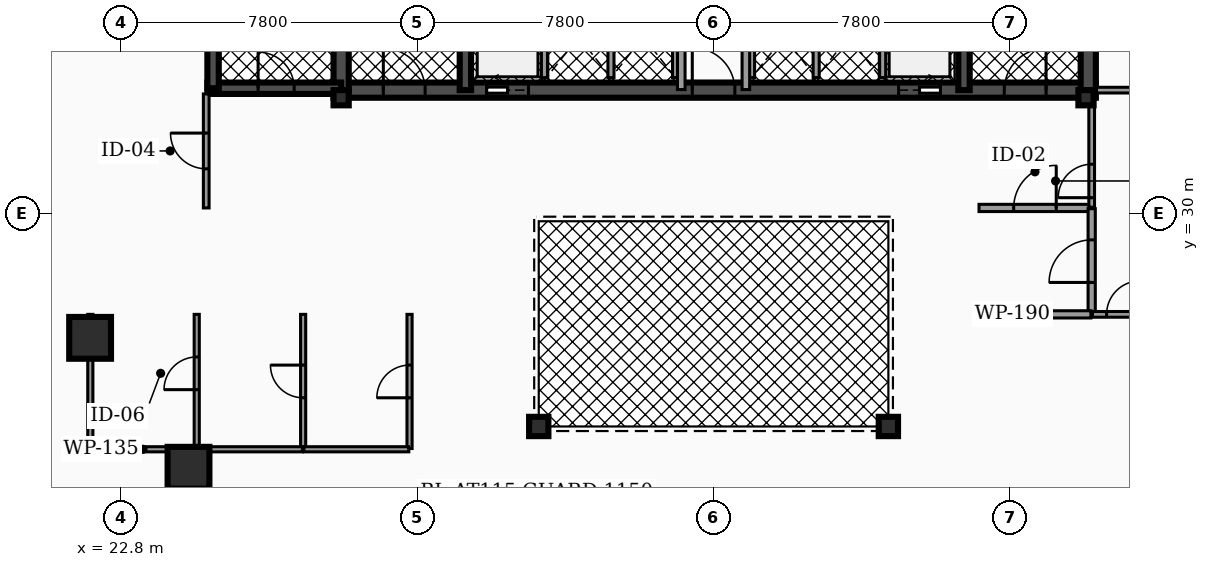
"""IFC4 building model, lengths in metres.
Left out: names, types, materials, properties, quantities, classifications, styles, units other than length and angle.
Written with IfcOpenShell. Run it as: python <this file> out.ifc"""

import sys

from ifc_helpers import new_model, si_unit, direction, frame, frame_2d, origin, origin_2d, place, context, subcontext, project, spatial, rectangle, hollow_rectangle, hollow_circle, extrude, element, fill, save


model = new_model("IFC4")
c1 = context("Model", 3, precision=1e-05, world=origin(), true_north=direction((0.0, 1.0)))
c2 = subcontext(c1, "Body", "Model", "MODEL_VIEW")
j1 = project(units=[si_unit("LENGTHUNIT", "METRE"), si_unit("PLANEANGLEUNIT", "RADIAN")], contexts=[c1])
p1 = place(None, origin())
s1 = spatial("IfcSite", under=j1, at=p1, CompositionType="ELEMENT")
p2 = place(p1, origin())
s2 = spatial("IfcBuilding", under=s1, at=p2, CompositionType="ELEMENT")
p3 = place(p2, frame((0.0, 0.0, 5.1)))
s3 = spatial("IfcBuildingStorey", under=s2, at=p3, CompositionType="ELEMENT", Elevation=5.1)
p4 = place(p3, frame((28.4, 33.25, 0.0), z_axis=(0.0, 0.0, 1.0), x_axis=(1.0, 0.0, 0.0)))
e1 = element("IfcWall", 1, at=p4, inside=s3, PredefinedType="SHEAR", context=c2, shape_type="SweptSolid", body=[
    extrude(rectangle(XDim=20.06, YDim=0.4, at=frame_2d((10.03, 0.0))), origin(), (0.0, 0.0, 1.0), 4.14),
])
p5 = place(p4, frame((4.03, 0.0, 0.0)))
e2 = element("IfcOpeningElement", 2, at=p5, cuts=e1, PredefinedType="OPENING", context=c2, shape_type="SweptSolid", body=[
    extrude(rectangle(XDim=1.1, YDim=2.15, at=frame_2d((0.55, 1.075))), frame((0.0, 0.21, 0.0), z_axis=(0.0, -1.0, 0.0), x_axis=(1.0, 0.0, 0.0)), (0.0, 0.0, 1.0), 0.42),
])
p6 = place(p4, frame((14.87, 0.0, 0.0)))
e3 = element("IfcOpeningElement", 3, at=p6, cuts=e1, PredefinedType="OPENING", context=c2, shape_type="SweptSolid", body=[
    extrude(rectangle(XDim=1.1, YDim=2.15, at=frame_2d((0.55, 1.075))), frame((0.0, 0.21, 0.0), z_axis=(0.0, -1.0, 0.0), x_axis=(1.0, 0.0, 0.0)), (0.0, 0.0, 1.0), 0.42),
])
p7 = place(p4, frame((1.31, 0.0, 0.0)))
e4 = element("IfcOpeningElement", 4, at=p7, cuts=e1, PredefinedType="OPENING", context=c2, shape_type="SweptSolid", body=[
    extrude(rectangle(XDim=1.1, YDim=2.2, at=frame_2d((0.55, 1.1))), frame((0.0, 0.21, 0.0), z_axis=(0.0, -1.0, 0.0), x_axis=(1.0, 0.0, 0.0)), (0.0, 0.0, 1.0), 0.42),
])
p8 = place(p4, frame((9.44, 0.0, 0.0)))
e5 = element("IfcOpeningElement", 5, at=p8, cuts=e1, PredefinedType="OPENING", context=c2, shape_type="SweptSolid", body=[
    extrude(rectangle(XDim=1.12, YDim=2.05, at=frame_2d((0.56, 1.025))), frame((0.0, 0.21, 0.0), z_axis=(0.0, -1.0, 0.0), x_axis=(1.0, 0.0, 0.0)), (0.0, 0.0, 1.0), 0.42),
])
p9 = place(p4, frame((17.65, 0.0, 0.0)))
e6 = element("IfcOpeningElement", 6, at=p9, cuts=e1, PredefinedType="OPENING", context=c2, shape_type="SweptSolid", body=[
    extrude(rectangle(XDim=1.1, YDim=2.2, at=frame_2d((0.55, 1.1))), frame((0.0, 0.21, 0.0), z_axis=(0.0, -1.0, 0.0), x_axis=(1.0, 0.0, 0.0)), (0.0, 0.0, 1.0), 0.42),
])
p10 = place(p3, frame((28.6, 33.25, 0.0), z_axis=(0.0, 0.0, 1.0), x_axis=(0.0, 1.0, 0.0)))
e7 = element("IfcWall", 7, at=p10, inside=s3, PredefinedType="SHEAR", context=c2, shape_type="SweptSolid", body=[
    extrude(rectangle(XDim=10.2, YDim=0.4, at=frame_2d((5.1, 0.0))), origin(), (0.0, 0.0, 1.0), 4.14),
])
for number, where, z_axis, x_axis in (
    (8, (31.87, 33.25, 0.0), (0.0, 0.0, 1.0), (0.0, 1.0, 0.0)),
    (9, (44.99, 33.25, 0.0), (0.0, 0.0, 1.0), (0.0, 1.0, 0.0)),
):
    element("IfcWall", number, at=place(p3, frame(where, z_axis=z_axis, x_axis=x_axis)), inside=s3, PredefinedType="SHEAR", context=c2, shape_type="SweptSolid", body=[
        extrude(rectangle(XDim=10.2, YDim=0.3, at=frame_2d((5.1, 0.0))), origin(), (0.0, 0.0, 1.0), 4.14),
    ])
p11 = place(p3, frame((48.26, 33.25, 0.0), z_axis=(0.0, 0.0, 1.0), x_axis=(0.0, 1.0, 0.0)))
e10 = element("IfcWall", 10, at=p11, inside=s3, PredefinedType="SHEAR", context=c2, shape_type="SweptSolid", body=[
    extrude(rectangle(XDim=10.2, YDim=0.4, at=frame_2d((5.1, 0.0))), origin(), (0.0, 0.0, 1.0), 4.14),
])
p12 = place(p3, frame((25.08, 33.3, 0.0), z_axis=(0.0, 0.0, 1.0), x_axis=(1.0, 0.0, 0.0)))
e11 = element("IfcWall", 11, at=p12, inside=s3, PredefinedType="SHEAR", context=c2, shape_type="SweptSolid", body=[
    extrude(rectangle(XDim=3.52, YDim=0.3, at=frame_2d((1.76, 0.0))), origin(), (0.0, 0.0, 1.0), 4.14),
])
p13 = place(p12, frame((1.335, 0.0, 0.0)))
e12 = element("IfcOpeningElement", 12, at=p13, cuts=e11, PredefinedType="OPENING", context=c2, shape_type="SweptSolid", body=[
    extrude(rectangle(XDim=0.95, YDim=2.2, at=frame_2d((0.475, 1.1))), frame((0.0, 0.16, 0.0), z_axis=(0.0, -1.0, 0.0), x_axis=(1.0, 0.0, 0.0)), (0.0, 0.0, 1.0), 0.32),
])
p14 = place(p3, frame((25.23, 33.3, 0.0), z_axis=(0.0, 0.0, 1.0), x_axis=(0.0, 1.0, 0.0)))
e13 = element("IfcWall", 13, at=p14, inside=s3, PredefinedType="SHEAR", context=c2, shape_type="SweptSolid", body=[
    extrude(rectangle(XDim=7.6, YDim=0.3, at=frame_2d((3.8, 0.0))), origin(), (0.0, 0.0, 1.0), 4.14),
])
for number, where, z_axis, x_axis in (
    (14, (21.994, 26.732, 0.0), (0.0, 0.0, 1.0), (1.0, 0.0, 0.0)),
    (15, (24.583, 23.314, 0.0), (0.0, 0.0, 1.0), (1.0, 0.0, 0.0)),
):
    element("IfcColumn", number, at=place(p3, frame(where, z_axis=z_axis, x_axis=x_axis)), inside=s3, PredefinedType="COLUMN", context=c2, shape_type="SweptSolid", body=[
        extrude(hollow_rectangle(XDim=1.1, YDim=1.1, WallThickness=0.055, at=origin_2d()), origin(), (0.0, 0.0, 1.0), 4.14),
    ])
for number, where, z_axis, x_axis in (
    (16, (28.6, 33.05, 0.0), (0.0, 0.0, 1.0), (1.0, 0.0, 0.0)),
    (17, (48.2, 33.05, 0.0), (0.0, 0.0, 1.0), (1.0, 0.0, 0.0)),
):
    element("IfcColumn", number, at=place(p3, frame(where, z_axis=z_axis, x_axis=x_axis)), inside=s3, PredefinedType="PILASTER", context=c2, shape_type="SweptSolid", body=[
        extrude(hollow_rectangle(XDim=0.4, YDim=0.4, WallThickness=0.02, at=origin_2d()), origin(), (0.0, 0.0, 1.0), 4.14),
    ])
for number, where, z_axis, x_axis in (
    (18, (33.8, 24.4, 0.0), (0.0, 0.0, 1.0), (1.0, 0.0, 0.0)),
    (19, (43.0, 24.4, 0.0), (0.0, 0.0, 1.0), (1.0, 0.0, 0.0)),
):
    element("IfcColumn", number, at=place(p3, frame(where, z_axis=z_axis, x_axis=x_axis)), inside=s3, PredefinedType="COLUMN", context=c2, shape_type="SweptSolid", body=[
        extrude(hollow_circle(Radius=0.254, WallThickness=0.02, at=origin_2d()), origin(), (0.0, 0.0, 1.0), 4.14),
    ])
for number, where, z_axis, x_axis in (
    (20, (33.95, 33.58, 0.0), (0.0, 0.0, 1.0), (0.0, 1.0, 0.0)),
    (21, (42.85, 33.58, 0.0), (0.0, 0.0, 1.0), (0.0, 1.0, 0.0)),
):
    element("IfcWall", number, at=place(p3, frame(where, z_axis=z_axis, x_axis=x_axis)), inside=s3, PredefinedType="SOLIDWALL", context=c2, shape_type="SweptSolid", body=[
        extrude(rectangle(XDim=2.45, YDim=0.16, at=frame_2d((1.225, 0.0))), origin(), (0.0, 0.0, 1.0), 3.112),
    ])
for number, where, z_axis, x_axis in (
    (22, (35.7, 33.58, 0.0), (0.0, 0.0, 1.0), (0.0, 1.0, 0.0)),
    (23, (37.4, 33.58, 0.0), (0.0, 0.0, 1.0), (0.0, 1.0, 0.0)),
    (24, (39.4, 33.58, 0.0), (0.0, 0.0, 1.0), (0.0, 1.0, 0.0)),
    (25, (41.1, 33.58, 0.0), (0.0, 0.0, 1.0), (0.0, 1.0, 0.0)),
):
    element("IfcWall", number, at=place(p3, frame(where, z_axis=z_axis, x_axis=x_axis)), inside=s3, PredefinedType="SOLIDWALL", context=c2, shape_type="SweptSolid", body=[
        extrude(rectangle(XDim=2.25, YDim=0.16, at=frame_2d((1.125, 0.0))), origin(), (0.0, 0.0, 1.0), 3.112),
    ])
p15 = place(p3, frame((37.55, 33.265, 0.0), z_axis=(0.0, 0.0, 1.0), x_axis=(0.0, 1.0, 0.0)))
e26 = element("IfcWall", 26, at=p15, inside=s3, PredefinedType="PARTITIONING", context=c2, shape_type="SweptSolid", body=[
    extrude(rectangle(XDim=4.265, YDim=0.2, at=frame_2d((2.133, 0.0))), origin(), (0.0, 0.0, 1.0), 3.097),
])
p16 = place(p15, frame((3.093, 0.0, 0.0)))
e27 = element("IfcOpeningElement", 27, at=p16, cuts=e26, PredefinedType="OPENING", context=c2, shape_type="SweptSolid", body=[
    extrude(rectangle(XDim=0.88, YDim=2.05, at=frame_2d((0.44, 1.025))), frame((0.0, 0.11, 0.0), z_axis=(0.0, -1.0, 0.0), x_axis=(1.0, 0.0, 0.0)), (0.0, 0.0, 1.0), 0.22),
])
p17 = place(p3, frame((39.25, 33.265, 0.0), z_axis=(0.0, 0.0, 1.0), x_axis=(0.0, 1.0, 0.0)))
e28 = element("IfcWall", 28, at=p17, inside=s3, PredefinedType="PARTITIONING", context=c2, shape_type="SweptSolid", body=[
    extrude(rectangle(XDim=4.265, YDim=0.2, at=frame_2d((2.133, 0.0))), origin(), (0.0, 0.0, 1.0), 3.097),
])
p18 = place(p17, frame((3.093, 0.0, 0.0)))
e29 = element("IfcOpeningElement", 29, at=p18, cuts=e28, PredefinedType="OPENING", context=c2, shape_type="SweptSolid", body=[
    extrude(rectangle(XDim=0.88, YDim=2.05, at=frame_2d((0.44, 1.025))), frame((0.0, 0.11, 0.0), z_axis=(0.0, -1.0, 0.0), x_axis=(1.0, 0.0, 0.0)), (0.0, 0.0, 1.0), 0.22),
])
p19 = place(p3, frame((45.385, 30.15, 0.0), z_axis=(0.0, 0.0, 1.0), x_axis=(1.0, 0.0, 0.0)))
e30 = element("IfcWall", 30, at=p19, inside=s3, PredefinedType="PARTITIONING", context=c2, shape_type="SweptSolid", body=[
    extrude(rectangle(XDim=2.945, YDim=0.19, at=frame_2d((1.473, 0.0))), origin(), (0.0, 0.0, 1.0), 3.097),
])
p20 = place(p19, frame((0.913, 0.0, 0.0)))
e31 = element("IfcOpeningElement", 31, at=p20, cuts=e30, PredefinedType="OPENING", context=c2, shape_type="SweptSolid", body=[
    extrude(rectangle(XDim=1.12, YDim=2.05, at=frame_2d((0.56, 1.025))), frame((0.0, 0.105, 0.0), z_axis=(0.0, -1.0, 0.0), x_axis=(1.0, 0.0, 0.0)), (0.0, 0.0, 1.0), 0.21),
])
p21 = place(p3, frame((48.35, 30.17, 0.0), z_axis=(0.0, 0.0, 1.0), x_axis=(0.0, 1.0, 0.0)))
e32 = element("IfcWall", 32, at=p21, inside=s3, PredefinedType="PARTITIONING", context=c2, shape_type="SweptSolid", body=[
    extrude(rectangle(XDim=2.975, YDim=0.15, at=frame_2d((1.488, 0.0))), origin(), (0.0, 0.0, 1.0), 3.097),
])
p22 = place(p21, frame((0.25, 0.0, 0.0)))
e33 = element("IfcOpeningElement", 33, at=p22, cuts=e32, PredefinedType="OPENING", context=c2, shape_type="SweptSolid", body=[
    extrude(rectangle(XDim=0.88, YDim=2.05, at=frame_2d((0.44, 1.025))), frame((0.0, 0.085, 0.0), z_axis=(0.0, -1.0, 0.0), x_axis=(1.0, 0.0, 0.0)), (0.0, 0.0, 1.0), 0.17),
])
p23 = place(p3, frame((25.05, 30.15, 0.0), z_axis=(0.0, 0.0, 1.0), x_axis=(0.0, 1.0, 0.0)))
e34 = element("IfcWall", 34, at=p23, inside=s3, PredefinedType="PARTITIONING", context=c2, shape_type="SweptSolid", body=[
    extrude(rectangle(XDim=3.0, YDim=0.15, at=frame_2d((1.5, 0.0))), origin(), (0.0, 0.0, 1.0), 3.097),
])
p24 = place(p23, frame((1.03, 0.0, 0.0)))
e35 = element("IfcOpeningElement", 35, at=p24, cuts=e34, PredefinedType="OPENING", context=c2, shape_type="SweptSolid", body=[
    extrude(rectangle(XDim=0.94, YDim=2.05, at=frame_2d((0.47, 1.025))), frame((0.0, 0.085, 0.0), z_axis=(0.0, -1.0, 0.0), x_axis=(1.0, 0.0, 0.0)), (0.0, 0.0, 1.0), 0.17),
])
p25 = place(p3, frame((48.35, 27.37, 0.0), z_axis=(0.0, 0.0, 1.0), x_axis=(0.0, 1.0, 0.0)))
e36 = element("IfcWall", 36, at=p25, inside=s3, PredefinedType="PARTITIONING", context=c2, shape_type="SweptSolid", body=[
    extrude(rectangle(XDim=2.76, YDim=0.19, at=frame_2d((1.38, 0.0))), origin(), (0.0, 0.0, 1.0), 3.097),
])
p26 = place(p25, frame((0.82, 0.0, 0.0)))
e37 = element("IfcOpeningElement", 37, at=p26, cuts=e36, PredefinedType="OPENING", context=c2, shape_type="SweptSolid", body=[
    extrude(rectangle(XDim=1.12, YDim=2.05, at=frame_2d((0.56, 1.025))), frame((0.0, 0.105, 0.0), z_axis=(0.0, -1.0, 0.0), x_axis=(1.0, 0.0, 0.0)), (0.0, 0.0, 1.0), 0.21),
])
p27 = place(p3, frame((45.4, 27.35, 0.0), z_axis=(0.0, 0.0, 1.0), x_axis=(1.0, 0.0, 0.0)))
e38 = element("IfcWall", 38, at=p27, inside=s3, PredefinedType="PARTITIONING", context=c2, shape_type="SweptSolid", body=[
    extrude(rectangle(XDim=2.93, YDim=0.19, at=frame_2d((1.465, 0.0))), origin(), (0.0, 0.0, 1.0), 3.097),
])
p28 = place(p3, frame((48.37, 27.35, 0.0), z_axis=(0.0, 0.0, 1.0), x_axis=(1.0, 0.0, 0.0)))
e39 = element("IfcWall", 39, at=p28, inside=s3, PredefinedType="PARTITIONING", context=c2, shape_type="SweptSolid", body=[
    extrude(rectangle(XDim=1.625, YDim=0.15, at=frame_2d((0.812, 0.0))), origin(), (0.0, 0.0, 1.0), 3.097),
])
p29 = place(p28, frame((0.373, 0.0, 0.0)))
e40 = element("IfcOpeningElement", 40, at=p29, cuts=e39, PredefinedType="OPENING", context=c2, shape_type="SweptSolid", body=[
    extrude(rectangle(XDim=0.88, YDim=2.05, at=frame_2d((0.44, 1.025))), frame((0.0, 0.085, 0.0), z_axis=(0.0, -1.0, 0.0), x_axis=(1.0, 0.0, 0.0)), (0.0, 0.0, 1.0), 0.17),
])
p30 = place(p3, frame((48.478, 33.25, 0.0), z_axis=(0.0, 0.0, 1.0), x_axis=(1.0, 0.0, 0.0)))
e41 = element("IfcWall", 41, at=p30, inside=s3, PredefinedType="PARTITIONING", context=c2, shape_type="SweptSolid", body=[
    extrude(rectangle(XDim=2.802, YDim=0.15, at=frame_2d((1.401, 0.0))), origin(), (0.0, 0.0, 1.0), 3.097),
])
p31 = place(p3, frame((24.8, 23.848, 0.0), z_axis=(0.0, 0.0, 1.0), x_axis=(0.0, 1.0, 0.0)))
e42 = element("IfcWall", 42, at=p31, inside=s3, PredefinedType="PARTITIONING", context=c2, shape_type="SweptSolid", body=[
    extrude(rectangle(XDim=3.502, YDim=0.135, at=frame_2d((1.751, 0.0))), origin(), (0.0, 0.0, 1.0), 3.097),
])
p32 = place(p31, frame((1.521, 0.0, 0.0)))
e43 = element("IfcOpeningElement", 43, at=p32, cuts=e42, PredefinedType="OPENING", context=c2, shape_type="SweptSolid", body=[
    extrude(rectangle(XDim=0.86, YDim=2.05, at=frame_2d((0.43, 1.025))), frame((0.0, 0.077, 0.0), z_axis=(0.0, -1.0, 0.0), x_axis=(1.0, 0.0, 0.0)), (0.0, 0.0, 1.0), 0.155),
])
p33 = place(p3, frame((22.02, 23.8, 0.0), z_axis=(0.0, 0.0, 1.0), x_axis=(1.0, 0.0, 0.0)))
e44 = element("IfcWall", 44, at=p33, inside=s3, PredefinedType="PARTITIONING", context=c2, shape_type="SweptSolid", body=[
    extrude(rectangle(XDim=2.732, YDim=0.135, at=frame_2d((1.366, 0.0))), origin(), (0.0, 0.0, 1.0), 3.097),
])
p34 = place(p3, frame((22.0, 23.82, 0.0), z_axis=(0.0, 0.0, 1.0), x_axis=(0.0, 1.0, 0.0)))
e45 = element("IfcWall", 45, at=p34, inside=s3, PredefinedType="PARTITIONING", context=c2, shape_type="SweptSolid", body=[
    extrude(rectangle(XDim=3.53, YDim=0.135, at=frame_2d((1.765, 0.0))), origin(), (0.0, 0.0, 1.0), 3.097),
])
p35 = place(p3, frame((27.6, 23.82, 0.0), z_axis=(0.0, 0.0, 1.0), x_axis=(0.0, 1.0, 0.0)))
e46 = element("IfcWall", 46, at=p35, inside=s3, PredefinedType="PARTITIONING", context=c2, shape_type="SweptSolid", body=[
    extrude(rectangle(XDim=3.53, YDim=0.135, at=frame_2d((1.765, 0.0))), origin(), (0.0, 0.0, 1.0), 3.097),
])
p36 = place(p35, frame((1.335, 0.0, 0.0)))
e47 = element("IfcOpeningElement", 47, at=p36, cuts=e46, PredefinedType="OPENING", context=c2, shape_type="SweptSolid", body=[
    extrude(rectangle(XDim=0.86, YDim=2.05, at=frame_2d((0.43, 1.025))), frame((0.0, 0.077, 0.0), z_axis=(0.0, -1.0, 0.0), x_axis=(1.0, 0.0, 0.0)), (0.0, 0.0, 1.0), 0.155),
])
p37 = place(p3, frame((24.848, 23.8, 0.0), z_axis=(0.0, 0.0, 1.0), x_axis=(1.0, 0.0, 0.0)))
e48 = element("IfcWall", 48, at=p37, inside=s3, PredefinedType="PARTITIONING", context=c2, shape_type="SweptSolid", body=[
    extrude(rectangle(XDim=2.732, YDim=0.135, at=frame_2d((1.366, 0.0))), origin(), (0.0, 0.0, 1.0), 3.097),
])
p38 = place(p3, frame((30.4, 23.82, 0.0), z_axis=(0.0, 0.0, 1.0), x_axis=(0.0, 1.0, 0.0)))
e49 = element("IfcWall", 49, at=p38, inside=s3, PredefinedType="PARTITIONING", context=c2, shape_type="SweptSolid", body=[
    extrude(rectangle(XDim=3.53, YDim=0.135, at=frame_2d((1.765, 0.0))), origin(), (0.0, 0.0, 1.0), 3.097),
])
p39 = place(p38, frame((1.335, 0.0, 0.0)))
e50 = element("IfcOpeningElement", 50, at=p39, cuts=e49, PredefinedType="OPENING", context=c2, shape_type="SweptSolid", body=[
    extrude(rectangle(XDim=0.86, YDim=2.05, at=frame_2d((0.43, 1.025))), frame((0.0, 0.077, 0.0), z_axis=(0.0, -1.0, 0.0), x_axis=(1.0, 0.0, 0.0)), (0.0, 0.0, 1.0), 0.155),
])
p40 = place(p3, frame((27.62, 23.8, 0.0), z_axis=(0.0, 0.0, 1.0), x_axis=(1.0, 0.0, 0.0)))
e51 = element("IfcWall", 51, at=p40, inside=s3, PredefinedType="PARTITIONING", context=c2, shape_type="SweptSolid", body=[
    extrude(rectangle(XDim=2.76, YDim=0.135, at=frame_2d((1.38, 0.0))), origin(), (0.0, 0.0, 1.0), 3.097),
])
p41 = place(p5, origin())
e52 = element("IfcDoor", 52, at=p41, inside=s3, OperationType="SLIDING_TO_LEFT", PredefinedType="DOOR", context=c2, shape_type="SweptSolid", body=[
    extrude(rectangle(XDim=1.1, YDim=2.15, at=frame_2d((0.55, 1.075))), frame((0.0, 0.025, 0.0), z_axis=(0.0, -1.0, 0.0), x_axis=(1.0, 0.0, 0.0)), (0.0, 0.0, 1.0), 0.05),
])
fill(e2, e52)
p42 = place(p6, origin())
e53 = element("IfcDoor", 53, at=p42, inside=s3, OperationType="SLIDING_TO_RIGHT", PredefinedType="DOOR", context=c2, shape_type="SweptSolid", body=[
    extrude(rectangle(XDim=1.1, YDim=2.15, at=frame_2d((0.55, 1.075))), frame((0.0, 0.025, 0.0), z_axis=(0.0, -1.0, 0.0), x_axis=(1.0, 0.0, 0.0)), (0.0, 0.0, 1.0), 0.05),
])
fill(e3, e53)
p43 = place(p7, origin())
e54 = element("IfcDoor", 54, at=p43, inside=s3, OperationType="SINGLE_SWING_LEFT", PredefinedType="DOOR", context=c2, shape_type="SweptSolid", body=[
    extrude(rectangle(XDim=1.1, YDim=2.2, at=frame_2d((0.55, 1.1))), frame((0.0, 0.025, 0.0), z_axis=(0.0, -1.0, 0.0), x_axis=(1.0, 0.0, 0.0)), (0.0, 0.0, 1.0), 0.05),
])
fill(e4, e54)
p44 = place(p8, origin())
e55 = element("IfcDoor", 55, at=p44, inside=s3, OperationType="SINGLE_SWING_LEFT", PredefinedType="DOOR", context=c2, shape_type="SweptSolid", body=[
    extrude(rectangle(XDim=1.12, YDim=2.05, at=frame_2d((0.56, 1.025))), frame((0.0, 0.025, 0.0), z_axis=(0.0, -1.0, 0.0), x_axis=(1.0, 0.0, 0.0)), (0.0, 0.0, 1.0), 0.05),
])
fill(e5, e55)
p45 = place(p9, origin())
e56 = element("IfcDoor", 56, at=p45, inside=s3, OperationType="SINGLE_SWING_RIGHT", PredefinedType="DOOR", context=c2, shape_type="SweptSolid", body=[
    extrude(rectangle(XDim=1.1, YDim=2.2, at=frame_2d((0.55, 1.1))), frame((0.0, 0.025, 0.0), z_axis=(0.0, -1.0, 0.0), x_axis=(1.0, 0.0, 0.0)), (0.0, 0.0, 1.0), 0.05),
])
fill(e6, e56)
p46 = place(p13, origin())
e57 = element("IfcDoor", 57, at=p46, inside=s3, OperationType="SINGLE_SWING_LEFT", PredefinedType="DOOR", context=c2, shape_type="SweptSolid", body=[
    extrude(rectangle(XDim=0.95, YDim=2.2, at=frame_2d((0.475, 1.1))), frame((0.0, 0.025, 0.0), z_axis=(0.0, -1.0, 0.0), x_axis=(1.0, 0.0, 0.0)), (0.0, 0.0, 1.0), 0.05),
])
fill(e12, e57)
p47 = place(p20, origin())
e58 = element("IfcDoor", 58, at=p47, inside=s3, OperationType="SINGLE_SWING_RIGHT", PredefinedType="DOOR", context=c2, shape_type="SweptSolid", body=[
    extrude(rectangle(XDim=1.12, YDim=2.05, at=frame_2d((0.56, 1.025))), frame((0.0, 0.025, 0.0), z_axis=(0.0, -1.0, 0.0), x_axis=(1.0, 0.0, 0.0)), (0.0, 0.0, 1.0), 0.05),
])
fill(e31, e58)
p48 = place(p22, origin())
e59 = element("IfcDoor", 59, at=p48, inside=s3, OperationType="SINGLE_SWING_LEFT", PredefinedType="DOOR", context=c2, shape_type="SweptSolid", body=[
    extrude(rectangle(XDim=0.88, YDim=2.05, at=frame_2d((0.44, 1.025))), frame((0.0, 0.025, 0.0), z_axis=(0.0, -1.0, 0.0), x_axis=(1.0, 0.0, 0.0)), (0.0, 0.0, 1.0), 0.05),
])
fill(e33, e59)
p49 = place(p24, origin())
e60 = element("IfcDoor", 60, at=p49, inside=s3, OperationType="SINGLE_SWING_RIGHT", PredefinedType="DOOR", context=c2, shape_type="SweptSolid", body=[
    extrude(rectangle(XDim=0.94, YDim=2.05, at=frame_2d((0.47, 1.025))), frame((0.0, 0.025, 0.0), z_axis=(0.0, -1.0, 0.0), x_axis=(1.0, 0.0, 0.0)), (0.0, 0.0, 1.0), 0.05),
])
fill(e35, e60)
p50 = place(p26, origin())
e61 = element("IfcDoor", 61, at=p50, inside=s3, OperationType="SINGLE_SWING_LEFT", PredefinedType="DOOR", context=c2, shape_type="SweptSolid", body=[
    extrude(rectangle(XDim=1.12, YDim=2.05, at=frame_2d((0.56, 1.025))), frame((0.0, 0.025, 0.0), z_axis=(0.0, -1.0, 0.0), x_axis=(1.0, 0.0, 0.0)), (0.0, 0.0, 1.0), 0.05),
])
fill(e37, e61)
p51 = place(p29, origin())
e62 = element("IfcDoor", 62, at=p51, inside=s3, OperationType="SINGLE_SWING_RIGHT", PredefinedType="DOOR", context=c2, shape_type="SweptSolid", body=[
    extrude(rectangle(XDim=0.88, YDim=2.05, at=frame_2d((0.44, 1.025))), frame((0.0, 0.025, 0.0), z_axis=(0.0, -1.0, 0.0), x_axis=(1.0, 0.0, 0.0)), (0.0, 0.0, 1.0), 0.05),
])
fill(e40, e62)
p52 = place(p32, origin())
e63 = element("IfcDoor", 63, at=p52, inside=s3, OperationType="SINGLE_SWING_LEFT", PredefinedType="DOOR", context=c2, shape_type="SweptSolid", body=[
    extrude(rectangle(XDim=0.86, YDim=2.05, at=frame_2d((0.43, 1.025))), frame((0.0, 0.025, 0.0), z_axis=(0.0, -1.0, 0.0), x_axis=(1.0, 0.0, 0.0)), (0.0, 0.0, 1.0), 0.05),
])
fill(e43, e63)
p53 = place(p36, origin())
e64 = element("IfcDoor", 64, at=p53, inside=s3, OperationType="SINGLE_SWING_RIGHT", PredefinedType="DOOR", context=c2, shape_type="SweptSolid", body=[
    extrude(rectangle(XDim=0.86, YDim=2.05, at=frame_2d((0.43, 1.025))), frame((0.0, 0.025, 0.0), z_axis=(0.0, -1.0, 0.0), x_axis=(1.0, 0.0, 0.0)), (0.0, 0.0, 1.0), 0.05),
])
fill(e47, e64)
p54 = place(p39, origin())
e65 = element("IfcDoor", 65, at=p54, inside=s3, OperationType="SINGLE_SWING_LEFT", PredefinedType="DOOR", context=c2, shape_type="SweptSolid", body=[
    extrude(rectangle(XDim=0.86, YDim=2.05, at=frame_2d((0.43, 1.025))), frame((0.0, 0.025, 0.0), z_axis=(0.0, -1.0, 0.0), x_axis=(1.0, 0.0, 0.0)), (0.0, 0.0, 1.0), 0.05),
])
fill(e50, e65)
save(model, sys.argv[1])
